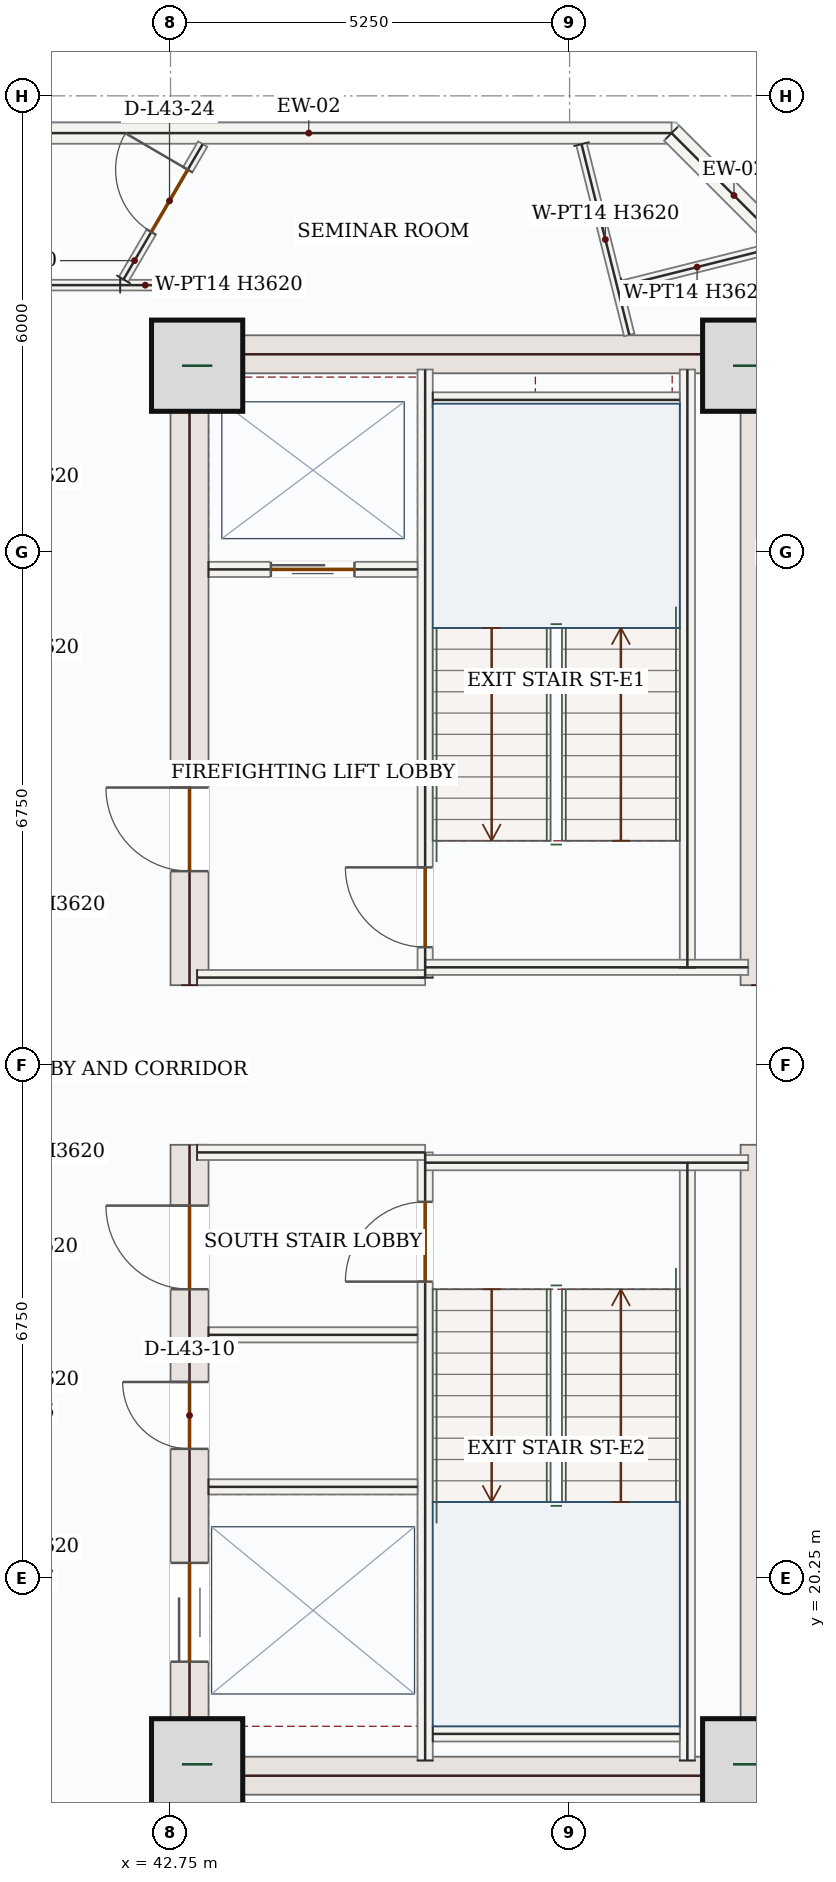
"""IFC4 building model, lengths in metres.
Left out: names, types, materials, properties, quantities, classifications, styles, units other than length and angle.
Written with IfcOpenShell. Run it as: python <this file> out.ifc"""

import sys

from ifc_helpers import new_model, si_unit, direction, frame, frame_2d, origin, origin_2d, place, context, subcontext, project, spatial, rectangle, extrude, source, transform, mapped, element, fill, save


model = new_model("IFC4")
c1 = context("Model", 3, precision=1e-05, world=origin(), true_north=direction((0.0, 1.0)))
c2 = subcontext(c1, "Body", "Model", "MODEL_VIEW")
j1 = project(units=[si_unit("LENGTHUNIT", "METRE"), si_unit("PLANEANGLEUNIT", "RADIAN")], contexts=[c1])
p1 = place(None, origin())
s1 = spatial("IfcSite", under=j1, at=p1, CompositionType="ELEMENT")
p2 = place(p1, origin())
s2 = spatial("IfcBuilding", under=s1, at=p2, CompositionType="ELEMENT")
p3 = place(p2, frame((0.0, 0.0, 186.3)))
s3 = spatial("IfcBuildingStorey", under=s2, at=p3, CompositionType="ELEMENT", Elevation=186.3)
p4 = place(p3, frame((43.0, 17.4, 0.0), z_axis=(0.0, 0.0, 1.0), x_axis=(0.0, 1.0, 0.0)))
e1 = element("IfcWall", 1, at=p4, inside=s3, PredefinedType="SHEAR", context=c2, shape_type="SweptSolid", body=[
    extrude(rectangle(XDim=8.55, YDim=0.5, at=frame_2d((4.275, 0.0))), origin(), (0.0, 0.0, 1.0), 3.62),
])
p5 = place(p4, frame((6.65, 0.0, 0.0)))
e2 = element("IfcOpeningElement", 2, at=p5, cuts=e1, PredefinedType="OPENING", context=c2, shape_type="SweptSolid", body=[
    extrude(rectangle(XDim=1.1, YDim=2.2, at=frame_2d((0.55, 1.1))), frame((0.0, 0.26, 0.0), z_axis=(0.0, -1.0, 0.0), x_axis=(1.0, 0.0, 0.0)), (0.0, 0.0, 1.0), 0.52),
])
p6 = place(p4, frame((1.75, 0.0, 0.0)))
e3 = element("IfcOpeningElement", 3, at=p6, cuts=e1, PredefinedType="OPENING", context=c2, shape_type="SweptSolid", body=[
    extrude(rectangle(XDim=1.3, YDim=2.2, at=frame_2d((0.65, 1.1))), frame((0.0, 0.26, 0.0), z_axis=(0.0, -1.0, 0.0), x_axis=(1.0, 0.0, 0.0)), (0.0, 0.0, 1.0), 0.52),
])
p7 = place(p4, frame((4.55, 0.0, 0.0)))
e4 = element("IfcOpeningElement", 4, at=p7, cuts=e1, PredefinedType="OPENING", context=c2, shape_type="SweptSolid", body=[
    extrude(rectangle(XDim=0.88, YDim=2.1, at=frame_2d((0.44, 1.05))), frame((0.0, 0.26, 0.0), z_axis=(0.0, -1.0, 0.0), x_axis=(1.0, 0.0, 0.0)), (0.0, 0.0, 1.0), 0.52),
])
p8 = place(p3, frame((43.0, 28.05, 0.0), z_axis=(0.0, 0.0, 1.0), x_axis=(0.0, 1.0, 0.0)))
e5 = element("IfcWall", 5, at=p8, inside=s3, PredefinedType="SHEAR", context=c2, shape_type="SweptSolid", body=[
    extrude(rectangle(XDim=8.55, YDim=0.5, at=frame_2d((4.275, 0.0))), origin(), (0.0, 0.0, 1.0), 3.62),
])
p9 = place(p8, frame((1.5, 0.0, 0.0)))
e6 = element("IfcOpeningElement", 6, at=p9, cuts=e5, PredefinedType="OPENING", context=c2, shape_type="SweptSolid", body=[
    extrude(rectangle(XDim=1.1, YDim=2.2, at=frame_2d((0.55, 1.1))), frame((0.0, 0.26, 0.0), z_axis=(0.0, -1.0, 0.0), x_axis=(1.0, 0.0, 0.0)), (0.0, 0.0, 1.0), 0.52),
])
m1 = source(origin(), c2, "Body", "SweptSolid", [
    extrude(rectangle(XDim=8.55, YDim=0.5, at=frame_2d((4.275, 0.0))), origin(), (0.0, 0.0, 1.0), 3.62),
])
for number, where, z_axis, x_axis in (
    (7, (50.5, 17.4, 0.0), (0.0, 0.0, 1.0), (0.0, 1.0, 0.0)),
    (8, (50.5, 28.05, 0.0), (0.0, 0.0, 1.0), (0.0, 1.0, 0.0)),
):
    element("IfcWall", number, at=place(p3, frame(where, z_axis=z_axis, x_axis=x_axis)), inside=s3, PredefinedType="SHEAR", context=c2, shape_type="MappedRepresentation", body=[
        mapped(m1, transform((0.0, 0.0, 0.0), x_axis=(1.0, 0.0, 0.0), y_axis=(0.0, 1.0, 0.0), z_axis=(0.0, 0.0, 1.0), scale=1.0)),
    ])
m2 = source(origin(), c2, "Body", "SweptSolid", [
    extrude(rectangle(XDim=7.0, YDim=0.5, at=frame_2d((3.5, 0.0))), origin(), (0.0, 0.0, 1.0), 3.62),
])
for number, where, z_axis, x_axis in (
    (9, (43.25, 17.65, 0.0), (0.0, 0.0, 1.0), (1.0, 0.0, 0.0)),
    (10, (43.25, 36.35, 0.0), (0.0, 0.0, 1.0), (1.0, 0.0, 0.0)),
):
    element("IfcWall", number, at=place(p3, frame(where, z_axis=z_axis, x_axis=x_axis)), inside=s3, PredefinedType="SHEAR", context=c2, shape_type="MappedRepresentation", body=[
        mapped(m2, transform((0.0, 0.0, 0.0), x_axis=(1.0, 0.0, 0.0), y_axis=(0.0, 1.0, 0.0), z_axis=(0.0, 0.0, 1.0), scale=1.0)),
    ])
m3 = source(origin(), c2, "Body", "SweptSolid", [
    extrude(rectangle(XDim=1.2, YDim=1.2, at=origin_2d()), origin(), (0.0, 0.0, 1.0), 3.9),
])
for number, where, z_axis, x_axis in (
    (11, (43.1, 17.8, 0.0), (0.0, 0.0, 1.0), (1.0, 0.0, 0.0)),
    (12, (50.35, 17.8, 0.0), (0.0, 0.0, 1.0), (1.0, 0.0, 0.0)),
    (13, (43.1, 36.2, 0.0), (0.0, 0.0, 1.0), (1.0, 0.0, 0.0)),
    (14, (50.35, 36.2, 0.0), (0.0, 0.0, 1.0), (1.0, 0.0, 0.0)),
):
    element("IfcColumn", number, at=place(p3, frame(where, z_axis=z_axis, x_axis=x_axis)), inside=s3, PredefinedType="COLUMN", context=c2, shape_type="MappedRepresentation", body=[
        mapped(m3, transform((0.0, 0.0, 0.0), x_axis=(1.0, 0.0, 0.0), y_axis=(0.0, 1.0, 0.0), z_axis=(0.0, 0.0, 1.0), scale=1.0)),
    ])
p10 = place(p3, frame((53.06, 18.458, 0.0), z_axis=(0.0, 0.0, 1.0), x_axis=(-0.707106781187, -0.707106781187, 0.0)))
e15 = element("IfcWall", 15, at=p10, inside=s3, PredefinedType="SOLIDWALL", context=c2, shape_type="SweptSolid", body=[
    extrude(rectangle(XDim=5.258, YDim=0.28, at=frame_2d((2.629, 0.0))), origin(), (0.0, 0.0, 1.0), 3.62),
])
p11 = place(p10, frame((1.729, 0.0, 0.85)))
e16 = element("IfcOpeningElement", 16, at=p11, cuts=e15, PredefinedType="OPENING", context=c2, shape_type="SweptSolid", body=[
    extrude(rectangle(XDim=1.8, YDim=1.75, at=frame_2d((0.9, 0.875))), frame((0.0, 0.15, 0.0), z_axis=(0.0, -1.0, 0.0), x_axis=(1.0, 0.0, 0.0)), (0.0, 0.0, 1.0), 0.3),
])
m4 = source(origin(), c2, "Body", "SweptSolid", [
    extrude(rectangle(XDim=9.547, YDim=0.28, at=frame_2d((4.773, 0.0))), origin(), (0.0, 0.0, 1.0), 3.62),
])
p12 = place(p3, frame((39.795, 39.26, 0.0), z_axis=(0.0, 0.0, 1.0), x_axis=(1.0, 0.0, 0.0)))
e17 = element("IfcWall", 17, at=p12, inside=s3, PredefinedType="SOLIDWALL", context=c2, shape_type="MappedRepresentation", body=[
    mapped(m4, transform((0.0, 0.0, 0.0), x_axis=(1.0, 0.0, 0.0), y_axis=(0.0, 1.0, 0.0), z_axis=(0.0, 0.0, 1.0), scale=1.0)),
])
m5 = source(origin(), c2, "Body", "SweptSolid", [
    extrude(rectangle(XDim=2.322, YDim=0.28, at=frame_2d((1.161, 0.0))), origin(), (0.0, 0.0, 1.0), 3.62),
])
p13 = place(p3, frame((49.342, 39.26, 0.0), z_axis=(0.0, 0.0, 1.0), x_axis=(0.707106781187, -0.707106781187, 0.0)))
e18 = element("IfcWall", 18, at=p13, inside=s3, PredefinedType="SOLIDWALL", context=c2, shape_type="MappedRepresentation", body=[
    mapped(m5, transform((0.0, 0.0, 0.0), x_axis=(1.0, 0.0, 0.0), y_axis=(0.0, 1.0, 0.0), z_axis=(0.0, 0.0, 1.0), scale=1.0)),
])
m6 = source(origin(), c2, "Body", "SweptSolid", [
    extrude(rectangle(XDim=7.87, YDim=0.2, at=frame_2d((3.935, 0.0))), origin(), (0.0, 0.0, 1.0), 3.62),
])
for number, where, z_axis, x_axis in (
    (19, (49.55, 17.85, 0.0), (0.0, 0.0, 1.0), (0.0, 1.0, 0.0)),
    (20, (49.55, 28.28, 0.0), (0.0, 0.0, 1.0), (0.0, 1.0, 0.0)),
):
    element("IfcWall", number, at=place(p3, frame(where, z_axis=z_axis, x_axis=x_axis)), inside=s3, PredefinedType="SOLIDWALL", context=c2, shape_type="MappedRepresentation", body=[
        mapped(m6, transform((0.0, 0.0, 0.0), x_axis=(1.0, 0.0, 0.0), y_axis=(0.0, 1.0, 0.0), z_axis=(0.0, 0.0, 1.0), scale=1.0)),
    ])
p14 = place(p3, frame((46.1, 17.85, 0.0), z_axis=(0.0, 0.0, 1.0), x_axis=(0.0, 1.0, 0.0)))
e21 = element("IfcWall", 21, at=p14, inside=s3, PredefinedType="SOLIDWALL", context=c2, shape_type="SweptSolid", body=[
    extrude(rectangle(XDim=8.0, YDim=0.2, at=frame_2d((4.0, 0.0))), origin(), (0.0, 0.0, 1.0), 3.62),
])
p15 = place(p14, frame((6.3, 0.0, 0.0)))
e22 = element("IfcOpeningElement", 22, at=p15, cuts=e21, PredefinedType="OPENING", context=c2, shape_type="SweptSolid", body=[
    extrude(rectangle(XDim=1.05, YDim=2.15, at=frame_2d((0.525, 1.075))), frame((0.0, 0.11, 0.0), z_axis=(0.0, -1.0, 0.0), x_axis=(1.0, 0.0, 0.0)), (0.0, 0.0, 1.0), 0.22),
])
p16 = place(p3, frame((46.1, 28.15, 0.0), z_axis=(0.0, 0.0, 1.0), x_axis=(0.0, 1.0, 0.0)))
e23 = element("IfcWall", 23, at=p16, inside=s3, PredefinedType="SOLIDWALL", context=c2, shape_type="SweptSolid", body=[
    extrude(rectangle(XDim=8.0, YDim=0.2, at=frame_2d((4.0, 0.0))), origin(), (0.0, 0.0, 1.0), 3.62),
])
p17 = place(p16, frame((0.4, 0.0, 0.0)))
e24 = element("IfcOpeningElement", 24, at=p17, cuts=e23, PredefinedType="OPENING", context=c2, shape_type="SweptSolid", body=[
    extrude(rectangle(XDim=1.05, YDim=2.15, at=frame_2d((0.525, 1.075))), frame((0.0, 0.11, 0.0), z_axis=(0.0, -1.0, 0.0), x_axis=(1.0, 0.0, 0.0)), (0.0, 0.0, 1.0), 0.22),
])
m7 = source(origin(), c2, "Body", "SweptSolid", [
    extrude(rectangle(XDim=3.0, YDim=0.2, at=frame_2d((1.5, 0.0))), origin(), (0.0, 0.0, 1.0), 3.62),
])
p18 = place(p3, frame((43.1, 25.85, 0.0), z_axis=(0.0, 0.0, 1.0), x_axis=(1.0, 0.0, 0.0)))
e25 = element("IfcWall", 25, at=p18, inside=s3, PredefinedType="SOLIDWALL", context=c2, shape_type="MappedRepresentation", body=[
    mapped(m7, transform((0.0, 0.0, 0.0), x_axis=(1.0, 0.0, 0.0), y_axis=(0.0, 1.0, 0.0), z_axis=(0.0, 0.0, 1.0), scale=1.0)),
])
m8 = source(origin(), c2, "Body", "SweptSolid", [
    extrude(rectangle(XDim=4.25, YDim=0.2, at=frame_2d((2.125, 0.0))), origin(), (0.0, 0.0, 1.0), 3.62),
])
p19 = place(p3, frame((46.1, 25.715, 0.0), z_axis=(0.0, 0.0, 1.0), x_axis=(1.0, 0.0, 0.0)))
e26 = element("IfcWall", 26, at=p19, inside=s3, PredefinedType="SOLIDWALL", context=c2, shape_type="MappedRepresentation", body=[
    mapped(m8, transform((0.0, 0.0, 0.0), x_axis=(1.0, 0.0, 0.0), y_axis=(0.0, 1.0, 0.0), z_axis=(0.0, 0.0, 1.0), scale=1.0)),
])
p20 = place(p3, frame((43.1, 28.15, 0.0), z_axis=(0.0, 0.0, 1.0), x_axis=(1.0, 0.0, 0.0)))
e27 = element("IfcWall", 27, at=p20, inside=s3, PredefinedType="SOLIDWALL", context=c2, shape_type="MappedRepresentation", body=[
    mapped(m7, transform((0.0, 0.0, 0.0), x_axis=(1.0, 0.0, 0.0), y_axis=(0.0, 1.0, 0.0), z_axis=(0.0, 0.0, 1.0), scale=1.0)),
])
p21 = place(p3, frame((46.1, 28.285, 0.0), z_axis=(0.0, 0.0, 1.0), x_axis=(1.0, 0.0, 0.0)))
e28 = element("IfcWall", 28, at=p21, inside=s3, PredefinedType="SOLIDWALL", context=c2, shape_type="MappedRepresentation", body=[
    mapped(m8, transform((0.0, 0.0, 0.0), x_axis=(1.0, 0.0, 0.0), y_axis=(0.0, 1.0, 0.0), z_axis=(0.0, 0.0, 1.0), scale=1.0)),
])
m9 = source(origin(), c2, "Body", "SweptSolid", [
    extrude(rectangle(XDim=3.25, YDim=0.2, at=frame_2d((1.625, 0.0))), origin(), (0.0, 0.0, 1.0), 3.62),
])
for number, where, z_axis, x_axis in (
    (29, (46.2, 35.75, 0.0), (0.0, 0.0, 1.0), (1.0, 0.0, 0.0)),
    (30, (46.2, 18.2, 0.0), (0.0, 0.0, 1.0), (1.0, 0.0, 0.0)),
):
    element("IfcWall", number, at=place(p3, frame(where, z_axis=z_axis, x_axis=x_axis)), inside=s3, PredefinedType="SOLIDWALL", context=c2, shape_type="MappedRepresentation", body=[
        mapped(m9, transform((0.0, 0.0, 0.0), x_axis=(1.0, 0.0, 0.0), y_axis=(0.0, 1.0, 0.0), z_axis=(0.0, 0.0, 1.0), scale=1.0)),
    ])
p22 = place(p3, frame((43.25, 33.52, 0.0), z_axis=(0.0, 0.0, 1.0), x_axis=(1.0, 0.0, 0.0)))
e31 = element("IfcWall", 31, at=p22, inside=s3, PredefinedType="SOLIDWALL", context=c2, shape_type="SweptSolid", body=[
    extrude(rectangle(XDim=2.75, YDim=0.2, at=frame_2d((1.375, 0.0))), origin(), (0.0, 0.0, 1.0), 3.62),
])
p23 = place(p22, frame((0.82, 0.0, 0.0)))
e32 = element("IfcOpeningElement", 32, at=p23, cuts=e31, PredefinedType="OPENING", context=c2, shape_type="SweptSolid", body=[
    extrude(rectangle(XDim=1.1, YDim=2.15, at=frame_2d((0.55, 1.075))), frame((0.0, 0.11, 0.0), z_axis=(0.0, -1.0, 0.0), x_axis=(1.0, 0.0, 0.0)), (0.0, 0.0, 1.0), 0.22),
])
m10 = source(origin(), c2, "Body", "SweptSolid", [
    extrude(rectangle(XDim=2.75, YDim=0.2, at=frame_2d((1.375, 0.0))), origin(), (0.0, 0.0, 1.0), 3.62),
])
for number, where, z_axis, x_axis in (
    (33, (43.25, 23.45, 0.0), (0.0, 0.0, 1.0), (1.0, 0.0, 0.0)),
    (34, (43.25, 21.45, 0.0), (0.0, 0.0, 1.0), (1.0, 0.0, 0.0)),
):
    element("IfcWall", number, at=place(p3, frame(where, z_axis=z_axis, x_axis=x_axis)), inside=s3, PredefinedType="SOLIDWALL", context=c2, shape_type="MappedRepresentation", body=[
        mapped(m10, transform((0.0, 0.0, 0.0), x_axis=(1.0, 0.0, 0.0), y_axis=(0.0, 1.0, 0.0), z_axis=(0.0, 0.0, 1.0), scale=1.0)),
    ])
m11 = source(origin(), c2, "Body", "SweptSolid", [
    extrude(rectangle(XDim=0.66, YDim=0.14, at=frame_2d((0.33, 0.0))), origin(), (0.0, 0.0, 1.0), 3.62),
])
p24 = place(p3, frame((42.748, 37.259, 0.0), z_axis=(0.0, 0.0, 1.0), x_axis=(-0.99999938363, 0.001110287991, 0.0)))
e35 = element("IfcWall", 35, at=p24, inside=s3, PredefinedType="PARTITIONING", context=c2, shape_type="MappedRepresentation", body=[
    mapped(m11, transform((0.0, 0.0, 0.0), x_axis=(1.0, 0.0, 0.0), y_axis=(0.0, 1.0, 0.0), z_axis=(0.0, 0.0, 1.0), scale=1.0)),
])
p25 = place(p3, frame((42.132, 37.335, 0.0), z_axis=(0.0, 0.0, 1.0), x_axis=(0.505011455642, 0.863112640198, 0.0)))
e36 = element("IfcWall", 36, at=p25, inside=s3, PredefinedType="PARTITIONING", context=c2, shape_type="SweptSolid", body=[
    extrude(rectangle(XDim=2.062, YDim=0.14, at=frame_2d((1.031, 0.0))), origin(), (0.0, 0.0, 1.0), 3.62),
])
p26 = place(p25, frame((0.723, 0.0, 0.0)))
e37 = element("IfcOpeningElement", 37, at=p26, cuts=e36, PredefinedType="OPENING", context=c2, shape_type="SweptSolid", body=[
    extrude(rectangle(XDim=0.95, YDim=2.15, at=frame_2d((0.475, 1.075))), frame((0.0, 0.08, 0.0), z_axis=(0.0, -1.0, 0.0), x_axis=(1.0, 0.0, 0.0)), (0.0, 0.0, 1.0), 0.16),
])
m12 = source(origin(), c2, "Body", "SweptSolid", [
    extrude(rectangle(XDim=2.588, YDim=0.14, at=frame_2d((1.294, 0.0))), origin(), (0.0, 0.0, 1.0), 3.62),
])
p27 = place(p3, frame((48.157, 39.115, 0.0), z_axis=(0.0, 0.0, 1.0), x_axis=(0.242957412811, -0.97003695577, 0.0)))
e38 = element("IfcWall", 38, at=p27, inside=s3, PredefinedType="PARTITIONING", context=c2, shape_type="MappedRepresentation", body=[
    mapped(m12, transform((0.0, 0.0, 0.0), x_axis=(1.0, 0.0, 0.0), y_axis=(0.0, 1.0, 0.0), z_axis=(0.0, 0.0, 1.0), scale=1.0)),
])
m13 = source(origin(), c2, "Body", "SweptSolid", [
    extrude(rectangle(XDim=2.014, YDim=0.14, at=frame_2d((1.007, 0.0))), origin(), (0.0, 0.0, 1.0), 3.62),
])
p28 = place(p3, frame((48.701, 37.253, 0.0), z_axis=(0.0, 0.0, 1.0), x_axis=(0.970056889313, 0.242877811867, 0.0)))
e39 = element("IfcWall", 39, at=p28, inside=s3, PredefinedType="PARTITIONING", context=c2, shape_type="MappedRepresentation", body=[
    mapped(m13, transform((0.0, 0.0, 0.0), x_axis=(1.0, 0.0, 0.0), y_axis=(0.0, 1.0, 0.0), z_axis=(0.0, 0.0, 1.0), scale=1.0)),
])
p29 = place(p3, frame((42.088, 37.26, 0.0), z_axis=(0.0, 0.0, 1.0), x_axis=(-1.0, 0.0, 0.0)))
e40 = element("IfcWall", 40, at=p29, inside=s3, PredefinedType="PARTITIONING", context=c2, shape_type="SweptSolid", body=[
    extrude(rectangle(XDim=7.806, YDim=0.14, at=frame_2d((3.903, 0.0))), origin(), (0.0, 0.0, 1.0), 3.62),
])
p30 = place(p29, frame((5.348, 0.0, 0.0)))
e41 = element("IfcOpeningElement", 41, at=p30, cuts=e40, PredefinedType="OPENING", context=c2, shape_type="SweptSolid", body=[
    extrude(rectangle(XDim=0.95, YDim=2.15, at=frame_2d((0.475, 1.075))), frame((0.0, 0.08, 0.0), z_axis=(0.0, -1.0, 0.0), x_axis=(1.0, 0.0, 0.0)), (0.0, 0.0, 1.0), 0.16),
])
m14 = source(origin(), c2, "Body", "SweptSolid", [
    extrude(rectangle(XDim=1.05, YDim=2.15, at=frame_2d((0.525, 1.075))), frame((0.0, 0.025, 0.0), z_axis=(0.0, -1.0, 0.0), x_axis=(1.0, 0.0, 0.0)), (0.0, 0.0, 1.0), 0.05),
])
p31 = place(p17, origin())
e42 = element("IfcDoor", 42, at=p31, inside=s3, OperationType="SINGLE_SWING_RIGHT", PredefinedType="DOOR", context=c2, shape_type="MappedRepresentation", body=[
    mapped(m14, transform((0.0, 0.0, 0.0), x_axis=(1.0, 0.0, 0.0), y_axis=(0.0, 1.0, 0.0), z_axis=(0.0, 0.0, 1.0), scale=1.0)),
])
fill(e24, e42)
p32 = place(p15, origin())
e43 = element("IfcDoor", 43, at=p32, inside=s3, OperationType="SINGLE_SWING_LEFT", PredefinedType="DOOR", context=c2, shape_type="MappedRepresentation", body=[
    mapped(m14, transform((0.0, 0.0, 0.0), x_axis=(1.0, 0.0, 0.0), y_axis=(0.0, 1.0, 0.0), z_axis=(0.0, 0.0, 1.0), scale=1.0)),
])
fill(e22, e43)
m15 = source(origin(), c2, "Body", "SweptSolid", [
    extrude(rectangle(XDim=1.1, YDim=2.15, at=frame_2d((0.55, 1.075))), frame((0.0, 0.025, 0.0), z_axis=(0.0, -1.0, 0.0), x_axis=(1.0, 0.0, 0.0)), (0.0, 0.0, 1.0), 0.05),
])
p33 = place(p23, origin())
e44 = element("IfcDoor", 44, at=p33, inside=s3, OperationType="DOUBLE_DOOR_SLIDING", PredefinedType="DOOR", context=c2, shape_type="MappedRepresentation", body=[
    mapped(m15, transform((0.0, 0.0, 0.0), x_axis=(1.0, 0.0, 0.0), y_axis=(0.0, 1.0, 0.0), z_axis=(0.0, 0.0, 1.0), scale=1.0)),
])
fill(e32, e44)
m16 = source(origin(), c2, "Body", "SweptSolid", [
    extrude(rectangle(XDim=1.1, YDim=2.2, at=frame_2d((0.55, 1.1))), frame((0.0, 0.025, 0.0), z_axis=(0.0, -1.0, 0.0), x_axis=(1.0, 0.0, 0.0)), (0.0, 0.0, 1.0), 0.05),
])
p34 = place(p9, origin())
e45 = element("IfcDoor", 45, at=p34, inside=s3, OperationType="SINGLE_SWING_RIGHT", PredefinedType="DOOR", context=c2, shape_type="MappedRepresentation", body=[
    mapped(m16, transform((0.0, 0.0, 0.0), x_axis=(1.0, 0.0, 0.0), y_axis=(0.0, 1.0, 0.0), z_axis=(0.0, 0.0, 1.0), scale=1.0)),
])
fill(e6, e45)
p35 = place(p5, origin())
e46 = element("IfcDoor", 46, at=p35, inside=s3, OperationType="SINGLE_SWING_RIGHT", PredefinedType="DOOR", context=c2, shape_type="MappedRepresentation", body=[
    mapped(m16, transform((0.0, 0.0, 0.0), x_axis=(1.0, 0.0, 0.0), y_axis=(0.0, 1.0, 0.0), z_axis=(0.0, 0.0, 1.0), scale=1.0)),
])
fill(e2, e46)
m17 = source(origin(), c2, "Body", "SweptSolid", [
    extrude(rectangle(XDim=1.3, YDim=2.2, at=frame_2d((0.65, 1.1))), frame((0.0, 0.025, 0.0), z_axis=(0.0, -1.0, 0.0), x_axis=(1.0, 0.0, 0.0)), (0.0, 0.0, 1.0), 0.05),
])
p36 = place(p6, origin())
e47 = element("IfcDoor", 47, at=p36, inside=s3, OperationType="DOUBLE_DOOR_SLIDING", PredefinedType="DOOR", context=c2, shape_type="MappedRepresentation", body=[
    mapped(m17, transform((0.0, 0.0, 0.0), x_axis=(1.0, 0.0, 0.0), y_axis=(0.0, 1.0, 0.0), z_axis=(0.0, 0.0, 1.0), scale=1.0)),
])
fill(e3, e47)
m18 = source(origin(), c2, "Body", "SweptSolid", [
    extrude(rectangle(XDim=0.88, YDim=2.1, at=frame_2d((0.44, 1.05))), frame((0.0, 0.025, 0.0), z_axis=(0.0, -1.0, 0.0), x_axis=(1.0, 0.0, 0.0)), (0.0, 0.0, 1.0), 0.05),
])
p37 = place(p7, origin())
e48 = element("IfcDoor", 48, at=p37, inside=s3, OperationType="SINGLE_SWING_RIGHT", PredefinedType="DOOR", context=c2, shape_type="MappedRepresentation", body=[
    mapped(m18, transform((0.0, 0.0, 0.0), x_axis=(1.0, 0.0, 0.0), y_axis=(0.0, 1.0, 0.0), z_axis=(0.0, 0.0, 1.0), scale=1.0)),
])
fill(e4, e48)
m19 = source(origin(), c2, "Body", "SweptSolid", [
    extrude(rectangle(XDim=0.95, YDim=2.15, at=frame_2d((0.475, 1.075))), frame((0.0, 0.025, 0.0), z_axis=(0.0, -1.0, 0.0), x_axis=(1.0, 0.0, 0.0)), (0.0, 0.0, 1.0), 0.05),
])
p38 = place(p26, origin())
e49 = element("IfcDoor", 49, at=p38, inside=s3, OperationType="SINGLE_SWING_RIGHT", PredefinedType="DOOR", context=c2, shape_type="MappedRepresentation", body=[
    mapped(m19, transform((0.0, 0.0, 0.0), x_axis=(1.0, 0.0, 0.0), y_axis=(0.0, 1.0, 0.0), z_axis=(0.0, 0.0, 1.0), scale=1.0)),
])
fill(e37, e49)
save(model, sys.argv[1])
